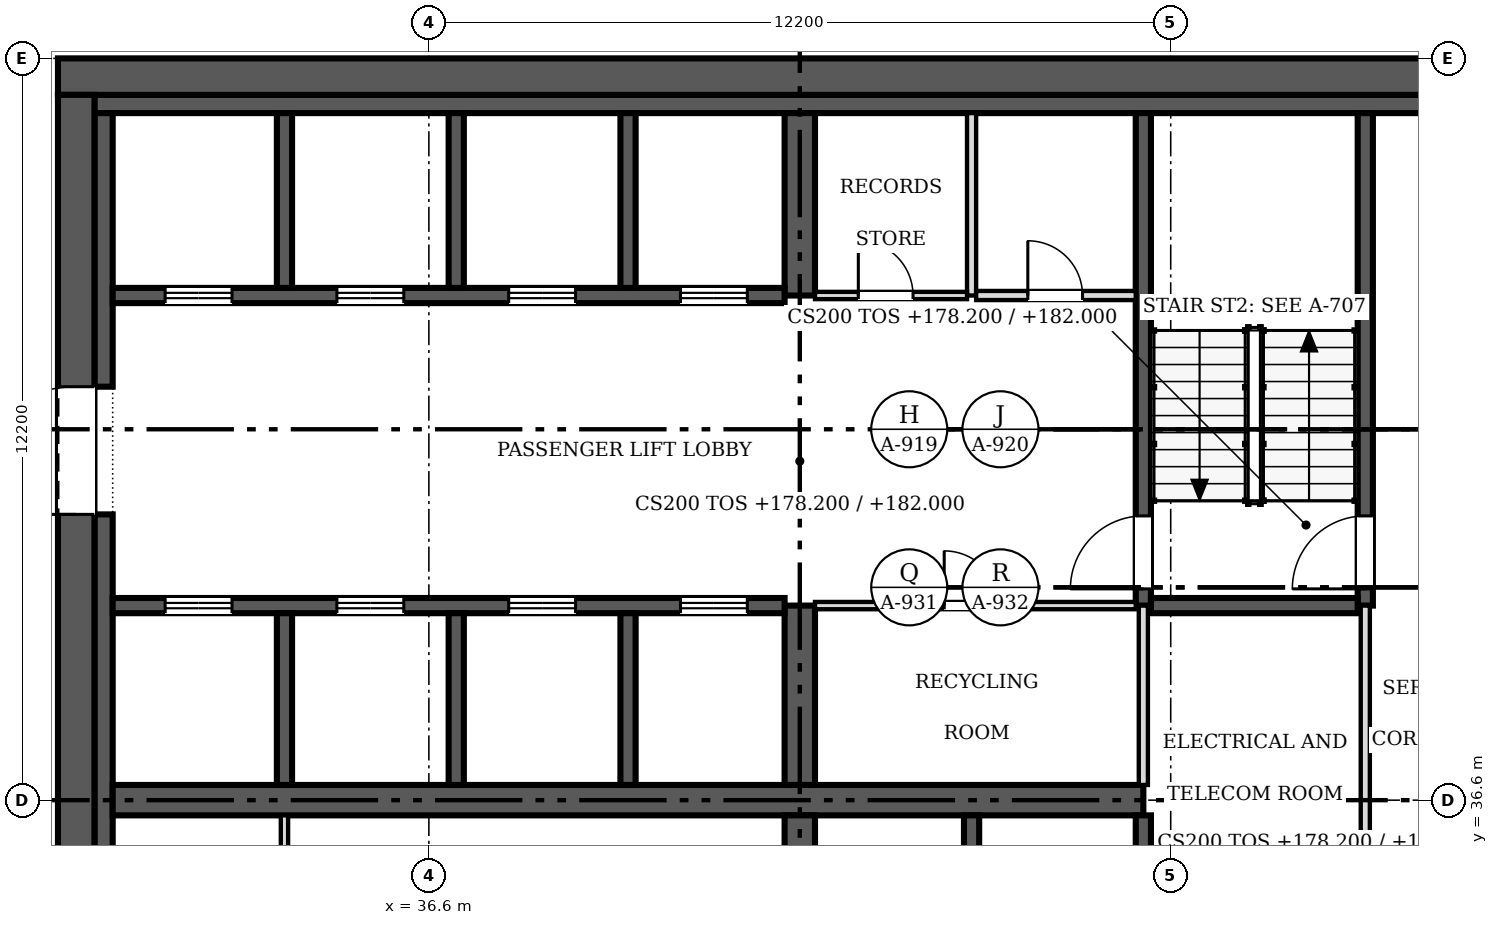
"""IFC4 building model, lengths in metres.
Left out: names, types, materials, properties, quantities, classifications, styles, units other than length and angle.
Written with IfcOpenShell. Run it as: python <this file> out.ifc"""

import sys

from ifc_helpers import new_model, si_unit, direction, frame, frame_2d, origin, place, context, subcontext, project, spatial, rectangle, extrude, source, transform, mapped, element, fill, save


model = new_model("IFC4")
c1 = context("Model", 3, precision=1e-05, world=origin(), true_north=direction((0.0, 1.0)))
c2 = subcontext(c1, "Body", "Model", "MODEL_VIEW")
j1 = project(units=[si_unit("LENGTHUNIT", "METRE"), si_unit("PLANEANGLEUNIT", "RADIAN")], contexts=[c1])
p1 = place(None, origin())
s1 = spatial("IfcSite", under=j1, at=p1, CompositionType="ELEMENT")
p2 = place(p1, origin())
s2 = spatial("IfcBuilding", under=s1, at=p2, CompositionType="ELEMENT")
p3 = place(p2, frame((0.0, 0.0, 178.2)))
s3 = spatial("IfcBuildingStorey", under=s2, at=p3, CompositionType="ELEMENT", Elevation=178.2)
p4 = place(p3, frame((30.8, 25.0, 0.0), z_axis=(0.0, 0.0, 1.0), x_axis=(0.0, 1.0, 0.0)))
e1 = element("IfcWall", 1, at=p4, inside=s3, PredefinedType="SHEAR", context=c2, shape_type="SweptSolid", body=[
    extrude(rectangle(XDim=23.2, YDim=0.6, at=frame_2d((11.6, 0.0))), origin(), (0.0, 0.0, 1.0), 3.8),
])
m1 = source(origin(), c2, "Body", "SweptSolid", [
    extrude(rectangle(XDim=2.1, YDim=2.4, at=frame_2d((1.05, 1.2))), frame((0.0, 0.31, 0.0), z_axis=(0.0, -1.0, 0.0), x_axis=(1.0, 0.0, 0.0)), (0.0, 0.0, 1.0), 0.62),
])
p5 = place(p4, frame((4.8, 0.0, 0.0)))
e2 = element("IfcOpeningElement", 2, at=p5, cuts=e1, PredefinedType="OPENING", context=c2, shape_type="MappedRepresentation", body=[
    mapped(m1, transform((0.0, 0.0, 0.0), scale=1.0)),
])
p6 = place(p4, frame((16.3, 0.0, 0.0)))
e3 = element("IfcOpeningElement", 3, at=p6, cuts=e1, PredefinedType="OPENING", context=c2, shape_type="MappedRepresentation", body=[
    mapped(m1, transform((0.0, 0.0, 0.0), scale=1.0)),
])
p7 = place(p3, frame((30.5, 48.5, 0.0), z_axis=(0.0, 0.0, 1.0), x_axis=(1.0, 0.0, 0.0)))
e4 = element("IfcWall", 4, at=p7, inside=s3, PredefinedType="SHEAR", context=c2, shape_type="SweptSolid", body=[
    extrude(rectangle(XDim=24.4, YDim=0.6, at=frame_2d((12.2, 0.0))), origin(), (0.0, 0.0, 1.0), 3.8),
])
p8 = place(p3, frame((31.1, 48.05, 0.0), z_axis=(0.0, 0.0, 1.0), x_axis=(1.0, 0.0, 0.0)))
e5 = element("IfcWall", 5, at=p8, inside=s3, PredefinedType="SOLIDWALL", context=c2, shape_type="SweptSolid", body=[
    extrude(rectangle(XDim=23.2, YDim=0.3, at=frame_2d((11.6, 0.0))), origin(), (0.0, 0.0, 1.0), 3.8),
])
p9 = place(p3, frame((31.25, 31.9, 0.0), z_axis=(0.0, 0.0, 1.0), x_axis=(0.0, 1.0, 0.0)))
e6 = element("IfcWall", 6, at=p9, inside=s3, PredefinedType="SOLIDWALL", context=c2, shape_type="SweptSolid", body=[
    extrude(rectangle(XDim=9.4, YDim=0.3, at=frame_2d((4.7, 0.0))), origin(), (0.0, 0.0, 1.0), 3.8),
])
p10 = place(p3, frame((31.25, 43.4, 0.0), z_axis=(0.0, 0.0, 1.0), x_axis=(0.0, 1.0, 0.0)))
e7 = element("IfcWall", 7, at=p10, inside=s3, PredefinedType="SOLIDWALL", context=c2, shape_type="SweptSolid", body=[
    extrude(rectangle(XDim=4.5, YDim=0.3, at=frame_2d((2.25, 0.0))), origin(), (0.0, 0.0, 1.0), 3.8),
])
p11 = place(p3, frame((31.4, 36.6, 0.0), z_axis=(0.0, 0.0, 1.0), x_axis=(1.0, 0.0, 0.0)))
e8 = element("IfcWall", 8, at=p11, inside=s3, PredefinedType="SHEAR", context=c2, shape_type="SweptSolid", body=[
    extrude(rectangle(XDim=16.95, YDim=0.5, at=frame_2d((8.475, 0.0))), origin(), (0.0, 0.0, 1.0), 3.8),
])
p12 = place(p3, frame((42.7, 36.35, 0.0), z_axis=(0.0, 0.0, 1.0), x_axis=(0.0, -1.0, 0.0)))
e9 = element("IfcWall", 9, at=p12, inside=s3, PredefinedType="SHEAR", context=c2, shape_type="SweptSolid", body=[
    extrude(rectangle(XDim=11.05, YDim=0.5, at=frame_2d((5.525, 0.0))), origin(), (0.0, 0.0, 1.0), 3.8),
])
m2 = source(origin(), c2, "Body", "SweptSolid", [
    extrude(rectangle(XDim=0.9, YDim=2.1, at=frame_2d((0.45, 1.05))), frame((0.0, 0.26, 0.0), z_axis=(0.0, -1.0, 0.0), x_axis=(1.0, 0.0, 0.0)), (0.0, 0.0, 1.0), 0.52),
])
p13 = place(p12, frame((6.5, 0.0, 0.0)))
e10 = element("IfcOpeningElement", 10, at=p13, cuts=e9, PredefinedType="OPENING", context=c2, shape_type="MappedRepresentation", body=[
    mapped(m2, transform((0.0, 0.0, 0.0), scale=1.0)),
])
m3 = source(origin(), c2, "Body", "SweptSolid", [
    extrude(rectangle(XDim=1.1, YDim=2.1, at=frame_2d((0.55, 1.05))), frame((0.0, 0.26, 0.0), z_axis=(0.0, -1.0, 0.0), x_axis=(1.0, 0.0, 0.0)), (0.0, 0.0, 1.0), 0.52),
])
p14 = place(p12, frame((3.8, 0.0, 0.0)))
e11 = element("IfcOpeningElement", 11, at=p14, cuts=e9, PredefinedType="OPENING", context=c2, shape_type="MappedRepresentation", body=[
    mapped(m3, transform((0.0, 0.0, 0.0), scale=1.0)),
])
p15 = place(p3, frame((42.7, 36.85, 0.0), z_axis=(0.0, 0.0, 1.0), x_axis=(0.0, 1.0, 0.0)))
e12 = element("IfcWall", 12, at=p15, inside=s3, PredefinedType="SHEAR", context=c2, shape_type="SweptSolid", body=[
    extrude(rectangle(XDim=2.95, YDim=0.5, at=frame_2d((1.475, 0.0))), origin(), (0.0, 0.0, 1.0), 3.8),
])
p16 = place(p3, frame((42.7, 44.9, 0.0), z_axis=(0.0, 0.0, 1.0), x_axis=(0.0, 1.0, 0.0)))
e13 = element("IfcWall", 13, at=p16, inside=s3, PredefinedType="SHEAR", context=c2, shape_type="SweptSolid", body=[
    extrude(rectangle(XDim=3.0, YDim=0.5, at=frame_2d((1.5, 0.0))), origin(), (0.0, 0.0, 1.0), 3.8),
])
p17 = place(p3, frame((31.4, 39.8, 0.0), z_axis=(0.0, 0.0, 1.0), x_axis=(1.0, 0.0, 0.0)))
e14 = element("IfcWall", 14, at=p17, inside=s3, PredefinedType="SOLIDWALL", context=c2, shape_type="SweptSolid", body=[
    extrude(rectangle(XDim=11.05, YDim=0.25, at=frame_2d((5.525, 0.0))), origin(), (0.0, 0.0, 1.0), 3.8),
])
m4 = source(origin(), c2, "Body", "SweptSolid", [
    extrude(rectangle(XDim=1.1, YDim=2.1, at=frame_2d((0.55, 1.05))), frame((0.0, 0.135, 0.0), z_axis=(0.0, -1.0, 0.0), x_axis=(1.0, 0.0, 0.0)), (0.0, 0.0, 1.0), 0.27),
])
p18 = place(p17, frame((0.863, 0.0, 0.0)))
e15 = element("IfcOpeningElement", 15, at=p18, cuts=e14, PredefinedType="OPENING", context=c2, shape_type="MappedRepresentation", body=[
    mapped(m4, transform((0.0, 0.0, 0.0), scale=1.0)),
])
p19 = place(p17, frame((3.688, 0.0, 0.0)))
e16 = element("IfcOpeningElement", 16, at=p19, cuts=e14, PredefinedType="OPENING", context=c2, shape_type="MappedRepresentation", body=[
    mapped(m4, transform((0.0, 0.0, 0.0), scale=1.0)),
])
p20 = place(p17, frame((6.512, 0.0, 0.0)))
e17 = element("IfcOpeningElement", 17, at=p20, cuts=e14, PredefinedType="OPENING", context=c2, shape_type="MappedRepresentation", body=[
    mapped(m4, transform((0.0, 0.0, 0.0), scale=1.0)),
])
p21 = place(p17, frame((9.337, 0.0, 0.0)))
e18 = element("IfcOpeningElement", 18, at=p21, cuts=e14, PredefinedType="OPENING", context=c2, shape_type="MappedRepresentation", body=[
    mapped(m4, transform((0.0, 0.0, 0.0), scale=1.0)),
])
p22 = place(p3, frame((42.45, 44.9, 0.0), z_axis=(0.0, 0.0, 1.0), x_axis=(-1.0, 0.0, 0.0)))
e19 = element("IfcWall", 19, at=p22, inside=s3, PredefinedType="SOLIDWALL", context=c2, shape_type="SweptSolid", body=[
    extrude(rectangle(XDim=11.05, YDim=0.25, at=frame_2d((5.525, 0.0))), origin(), (0.0, 0.0, 1.0), 3.8),
])
p23 = place(p22, frame((9.087, 0.0, 0.0)))
e20 = element("IfcOpeningElement", 20, at=p23, cuts=e19, PredefinedType="OPENING", context=c2, shape_type="MappedRepresentation", body=[
    mapped(m4, transform((0.0, 0.0, 0.0), scale=1.0)),
])
p24 = place(p22, frame((6.262, 0.0, 0.0)))
e21 = element("IfcOpeningElement", 21, at=p24, cuts=e19, PredefinedType="OPENING", context=c2, shape_type="MappedRepresentation", body=[
    mapped(m4, transform((0.0, 0.0, 0.0), scale=1.0)),
])
p25 = place(p22, frame((3.438, 0.0, 0.0)))
e22 = element("IfcOpeningElement", 22, at=p25, cuts=e19, PredefinedType="OPENING", context=c2, shape_type="MappedRepresentation", body=[
    mapped(m4, transform((0.0, 0.0, 0.0), scale=1.0)),
])
p26 = place(p22, frame((0.613, 0.0, 0.0)))
e23 = element("IfcOpeningElement", 23, at=p26, cuts=e19, PredefinedType="OPENING", context=c2, shape_type="MappedRepresentation", body=[
    mapped(m4, transform((0.0, 0.0, 0.0), scale=1.0)),
])
p27 = place(p3, frame((48.35, 36.35, 0.0), z_axis=(0.0, 0.0, 1.0), x_axis=(0.0, -1.0, 0.0)))
e24 = element("IfcWall", 24, at=p27, inside=s3, PredefinedType="SOLIDWALL", context=c2, shape_type="SweptSolid", body=[
    extrude(rectangle(XDim=11.05, YDim=0.25, at=frame_2d((5.525, 0.0))), origin(), (0.0, 0.0, 1.0), 3.8),
])
m5 = source(origin(), c2, "Body", "SweptSolid", [
    extrude(rectangle(XDim=1.2, YDim=2.1, at=frame_2d((0.6, 1.05))), frame((0.0, 0.135, 0.0), z_axis=(0.0, -1.0, 0.0), x_axis=(1.0, 0.0, 0.0)), (0.0, 0.0, 1.0), 0.27),
])
p28 = place(p27, frame((3.225, 0.0, 0.0)))
e25 = element("IfcOpeningElement", 25, at=p28, cuts=e24, PredefinedType="OPENING", context=c2, shape_type="MappedRepresentation", body=[
    mapped(m5, transform((0.0, 0.0, 0.0), scale=1.0)),
])
p29 = place(p3, frame((48.35, 47.9, 0.0), z_axis=(0.0, 0.0, 1.0), x_axis=(0.0, -1.0, 0.0)))
e26 = element("IfcWall", 26, at=p29, inside=s3, PredefinedType="SOLIDWALL", context=c2, shape_type="SweptSolid", body=[
    extrude(rectangle(XDim=8.1, YDim=0.25, at=frame_2d((4.05, 0.0))), origin(), (0.0, 0.0, 1.0), 3.8),
])
p30 = place(p29, frame((6.625, 0.0, 0.0)))
e27 = element("IfcOpeningElement", 27, at=p30, cuts=e26, PredefinedType="OPENING", context=c2, shape_type="MappedRepresentation", body=[
    mapped(m5, transform((0.0, 0.0, 0.0), scale=1.0)),
])
p31 = place(p3, frame((52.0, 39.8, 0.0), z_axis=(0.0, 0.0, 1.0), x_axis=(0.0, 1.0, 0.0)))
e28 = element("IfcWall", 28, at=p31, inside=s3, PredefinedType="SOLIDWALL", context=c2, shape_type="SweptSolid", body=[
    extrude(rectangle(XDim=8.1, YDim=0.25, at=frame_2d((4.05, 0.0))), origin(), (0.0, 0.0, 1.0), 3.8),
])
p32 = place(p31, frame((0.275, 0.0, 0.0)))
e29 = element("IfcOpeningElement", 29, at=p32, cuts=e28, PredefinedType="OPENING", context=c2, shape_type="MappedRepresentation", body=[
    mapped(m5, transform((0.0, 0.0, 0.0), scale=1.0)),
])
p33 = place(p3, frame((48.475, 39.8, 0.0), z_axis=(0.0, 0.0, 1.0), x_axis=(1.0, 0.0, 0.0)))
e30 = element("IfcWall", 30, at=p33, inside=s3, PredefinedType="SOLIDWALL", context=c2, shape_type="SweptSolid", body=[
    extrude(rectangle(XDim=3.4, YDim=0.25, at=frame_2d((1.7, 0.0))), origin(), (0.0, 0.0, 1.0), 3.8),
])
for number, where, z_axis, x_axis in (
    (31, (34.225, 36.85, 0.0), (0.0, 0.0, 1.0), (0.0, 1.0, 0.0)),
    (32, (37.05, 36.85, 0.0), (0.0, 0.0, 1.0), (0.0, 1.0, 0.0)),
    (33, (39.875, 36.85, 0.0), (0.0, 0.0, 1.0), (0.0, 1.0, 0.0)),
):
    element("IfcWall", number, at=place(p3, frame(where, z_axis=z_axis, x_axis=x_axis)), inside=s3, PredefinedType="SOLIDWALL", context=c2, shape_type="SweptSolid", body=[
        extrude(rectangle(XDim=2.825, YDim=0.25, at=frame_2d((1.413, 0.0))), origin(), (0.0, 0.0, 1.0), 3.8),
    ])
p34 = place(p3, frame((45.525, 33.525, 0.0), z_axis=(0.0, 0.0, 1.0), x_axis=(0.0, 1.0, 0.0)))
e34 = element("IfcWall", 34, at=p34, inside=s3, PredefinedType="SOLIDWALL", context=c2, shape_type="SweptSolid", body=[
    extrude(rectangle(XDim=2.825, YDim=0.25, at=frame_2d((1.413, 0.0))), origin(), (0.0, 0.0, 1.0), 3.8),
])
for number, where, z_axis, x_axis in (
    (35, (34.225, 45.025, 0.0), (0.0, 0.0, 1.0), (0.0, 1.0, 0.0)),
    (36, (37.05, 45.025, 0.0), (0.0, 0.0, 1.0), (0.0, 1.0, 0.0)),
    (37, (39.875, 45.025, 0.0), (0.0, 0.0, 1.0), (0.0, 1.0, 0.0)),
):
    element("IfcWall", number, at=place(p3, frame(where, z_axis=z_axis, x_axis=x_axis)), inside=s3, PredefinedType="SOLIDWALL", context=c2, shape_type="SweptSolid", body=[
        extrude(rectangle(XDim=2.875, YDim=0.25, at=frame_2d((1.438, 0.0))), origin(), (0.0, 0.0, 1.0), 3.8),
    ])
p35 = place(p3, frame((52.0, 33.525, 0.0), z_axis=(0.0, 0.0, 1.0), x_axis=(0.0, 1.0, 0.0)))
e38 = element("IfcWall", 38, at=p35, inside=s3, PredefinedType="PARTITIONING", context=c2, shape_type="SweptSolid", body=[
    extrude(rectangle(XDim=6.275, YDim=0.15, at=frame_2d((3.138, 0.0))), origin(), (0.0, 0.0, 1.0), 3.6),
])
m6 = source(origin(), c2, "Body", "SweptSolid", [
    extrude(rectangle(XDim=0.9, YDim=2.1, at=frame_2d((0.45, 1.05))), frame((0.0, 0.085, 0.0), z_axis=(0.0, -1.0, 0.0), x_axis=(1.0, 0.0, 0.0)), (0.0, 0.0, 1.0), 0.17),
])
p36 = place(p35, frame((1.025, 0.0, 0.0)))
e39 = element("IfcOpeningElement", 39, at=p36, cuts=e38, PredefinedType="OPENING", context=c2, shape_type="MappedRepresentation", body=[
    mapped(m6, transform((0.0, 0.0, 0.0), scale=1.0)),
])
p37 = place(p3, frame((48.225, 39.8, 0.0), z_axis=(0.0, 0.0, 1.0), x_axis=(-1.0, 0.0, 0.0)))
e40 = element("IfcWall", 40, at=p37, inside=s3, PredefinedType="PARTITIONING", context=c2, shape_type="SweptSolid", body=[
    extrude(rectangle(XDim=5.275, YDim=0.12, at=frame_2d((2.638, 0.0))), origin(), (0.0, 0.0, 1.0), 3.6),
])
m7 = source(origin(), c2, "Body", "SweptSolid", [
    extrude(rectangle(XDim=0.9, YDim=2.1, at=frame_2d((0.45, 1.05))), frame((0.0, 0.07, 0.0), z_axis=(0.0, -1.0, 0.0), x_axis=(1.0, 0.0, 0.0)), (0.0, 0.0, 1.0), 0.14),
])
p38 = place(p37, frame((2.25, 0.0, 0.0)))
e41 = element("IfcOpeningElement", 41, at=p38, cuts=e40, PredefinedType="OPENING", context=c2, shape_type="MappedRepresentation", body=[
    mapped(m7, transform((0.0, 0.0, 0.0), scale=1.0)),
])
p39 = place(p3, frame((48.35, 36.85, 0.0), z_axis=(0.0, 0.0, 1.0), x_axis=(0.0, 1.0, 0.0)))
e42 = element("IfcWall", 42, at=p39, inside=s3, PredefinedType="PARTITIONING", context=c2, shape_type="SweptSolid", body=[
    extrude(rectangle(XDim=2.95, YDim=0.15, at=frame_2d((1.475, 0.0))), origin(), (0.0, 0.0, 1.0), 3.6),
])
p40 = place(p3, frame((34.225, 33.46, 0.0), z_axis=(0.0, 0.0, 1.0), x_axis=(0.0, 1.0, 0.0)))
e43 = element("IfcWall", 43, at=p40, inside=s3, PredefinedType="PARTITIONING", context=c2, shape_type="SweptSolid", body=[
    extrude(rectangle(XDim=2.89, YDim=0.12, at=frame_2d((1.445, 0.0))), origin(), (0.0, 0.0, 1.0), 3.6),
])
p41 = place(p3, frame((45.525, 44.9, 0.0), z_axis=(0.0, 0.0, 1.0), x_axis=(0.0, 1.0, 0.0)))
e44 = element("IfcWall", 44, at=p41, inside=s3, PredefinedType="PARTITIONING", context=c2, shape_type="SweptSolid", body=[
    extrude(rectangle(XDim=3.0, YDim=0.15, at=frame_2d((1.5, 0.0))), origin(), (0.0, 0.0, 1.0), 3.6),
])
p42 = place(p3, frame((42.95, 44.9, 0.0), z_axis=(0.0, 0.0, 1.0), x_axis=(1.0, 0.0, 0.0)))
e45 = element("IfcWall", 45, at=p42, inside=s3, PredefinedType="PARTITIONING", context=c2, shape_type="SweptSolid", body=[
    extrude(rectangle(XDim=2.5, YDim=0.12, at=frame_2d((1.25, 0.0))), origin(), (0.0, 0.0, 1.0), 3.6),
])
p43 = place(p42, frame((0.712, 0.0, 0.0)))
e46 = element("IfcOpeningElement", 46, at=p43, cuts=e45, PredefinedType="OPENING", context=c2, shape_type="MappedRepresentation", body=[
    mapped(m7, transform((0.0, 0.0, 0.0), scale=1.0)),
])
p44 = place(p3, frame((45.6, 44.9, 0.0), z_axis=(0.0, 0.0, 1.0), x_axis=(1.0, 0.0, 0.0)))
e47 = element("IfcWall", 47, at=p44, inside=s3, PredefinedType="PARTITIONING", context=c2, shape_type="SweptSolid", body=[
    extrude(rectangle(XDim=2.625, YDim=0.15, at=frame_2d((1.312, 0.0))), origin(), (0.0, 0.0, 1.0), 3.6),
])
p45 = place(p44, frame((0.85, 0.0, 0.0)))
e48 = element("IfcOpeningElement", 48, at=p45, cuts=e47, PredefinedType="OPENING", context=c2, shape_type="MappedRepresentation", body=[
    mapped(m6, transform((0.0, 0.0, 0.0), scale=1.0)),
])
m8 = source(origin(), c2, "Body", "SweptSolid", [
    extrude(rectangle(XDim=2.1, YDim=2.4, at=frame_2d((1.05, 1.2))), frame((0.0, 0.025, 0.0), z_axis=(0.0, -1.0, 0.0), x_axis=(1.0, 0.0, 0.0)), (0.0, 0.0, 1.0), 0.05),
])
p46 = place(p6, origin())
e49 = element("IfcDoor", 49, at=p46, inside=s3, OperationType="DOUBLE_DOOR_SINGLE_SWING", PredefinedType="DOOR", context=c2, shape_type="MappedRepresentation", body=[
    mapped(m8, transform((0.0, 0.0, 0.0), scale=1.0)),
])
fill(e3, e49)
m9 = source(origin(), c2, "Body", "SweptSolid", [
    extrude(rectangle(XDim=1.1, YDim=2.1, at=frame_2d((0.55, 1.05))), frame((0.0, 0.025, 0.0), z_axis=(0.0, -1.0, 0.0), x_axis=(1.0, 0.0, 0.0)), (0.0, 0.0, 1.0), 0.05),
])
p47 = place(p18, origin())
e50 = element("IfcDoor", 50, at=p47, inside=s3, OperationType="DOUBLE_DOOR_SLIDING", PredefinedType="DOOR", context=c2, shape_type="MappedRepresentation", body=[
    mapped(m9, transform((0.0, 0.0, 0.0), scale=1.0)),
])
fill(e15, e50)
p48 = place(p19, origin())
e51 = element("IfcDoor", 51, at=p48, inside=s3, OperationType="DOUBLE_DOOR_SLIDING", PredefinedType="DOOR", context=c2, shape_type="MappedRepresentation", body=[
    mapped(m9, transform((0.0, 0.0, 0.0), scale=1.0)),
])
fill(e16, e51)
p49 = place(p20, origin())
e52 = element("IfcDoor", 52, at=p49, inside=s3, OperationType="DOUBLE_DOOR_SLIDING", PredefinedType="DOOR", context=c2, shape_type="MappedRepresentation", body=[
    mapped(m9, transform((0.0, 0.0, 0.0), scale=1.0)),
])
fill(e17, e52)
p50 = place(p21, origin())
e53 = element("IfcDoor", 53, at=p50, inside=s3, OperationType="DOUBLE_DOOR_SLIDING", PredefinedType="DOOR", context=c2, shape_type="MappedRepresentation", body=[
    mapped(m9, transform((0.0, 0.0, 0.0), scale=1.0)),
])
fill(e18, e53)
p51 = place(p23, origin())
e54 = element("IfcDoor", 54, at=p51, inside=s3, OperationType="DOUBLE_DOOR_SLIDING", PredefinedType="DOOR", context=c2, shape_type="MappedRepresentation", body=[
    mapped(m9, transform((0.0, 0.0, 0.0), scale=1.0)),
])
fill(e20, e54)
p52 = place(p24, origin())
e55 = element("IfcDoor", 55, at=p52, inside=s3, OperationType="DOUBLE_DOOR_SLIDING", PredefinedType="DOOR", context=c2, shape_type="MappedRepresentation", body=[
    mapped(m9, transform((0.0, 0.0, 0.0), scale=1.0)),
])
fill(e21, e55)
p53 = place(p25, origin())
e56 = element("IfcDoor", 56, at=p53, inside=s3, OperationType="DOUBLE_DOOR_SLIDING", PredefinedType="DOOR", context=c2, shape_type="MappedRepresentation", body=[
    mapped(m9, transform((0.0, 0.0, 0.0), scale=1.0)),
])
fill(e22, e56)
p54 = place(p26, origin())
e57 = element("IfcDoor", 57, at=p54, inside=s3, OperationType="DOUBLE_DOOR_SLIDING", PredefinedType="DOOR", context=c2, shape_type="MappedRepresentation", body=[
    mapped(m9, transform((0.0, 0.0, 0.0), scale=1.0)),
])
fill(e23, e57)
m10 = source(origin(), c2, "Body", "SweptSolid", [
    extrude(rectangle(XDim=1.2, YDim=2.1, at=frame_2d((0.6, 1.05))), frame((0.0, 0.025, 0.0), z_axis=(0.0, -1.0, 0.0), x_axis=(1.0, 0.0, 0.0)), (0.0, 0.0, 1.0), 0.05),
])
p55 = place(p30, origin())
e58 = element("IfcDoor", 58, at=p55, inside=s3, OperationType="SINGLE_SWING_RIGHT", PredefinedType="DOOR", context=c2, shape_type="MappedRepresentation", body=[
    mapped(m10, transform((0.0, 0.0, 0.0), scale=1.0)),
])
fill(e27, e58)
p56 = place(p32, origin())
e59 = element("IfcDoor", 59, at=p56, inside=s3, OperationType="SINGLE_SWING_LEFT", PredefinedType="DOOR", context=c2, shape_type="MappedRepresentation", body=[
    mapped(m10, transform((0.0, 0.0, 0.0), scale=1.0)),
])
fill(e29, e59)
m11 = source(origin(), c2, "Body", "SweptSolid", [
    extrude(rectangle(XDim=0.9, YDim=2.1, at=frame_2d((0.45, 1.05))), frame((0.0, 0.025, 0.0), z_axis=(0.0, -1.0, 0.0), x_axis=(1.0, 0.0, 0.0)), (0.0, 0.0, 1.0), 0.05),
])
p57 = place(p38, origin())
e60 = element("IfcDoor", 60, at=p57, inside=s3, OperationType="SINGLE_SWING_RIGHT", PredefinedType="DOOR", context=c2, shape_type="MappedRepresentation", body=[
    mapped(m11, transform((0.0, 0.0, 0.0), scale=1.0)),
])
fill(e41, e60)
p58 = place(p43, origin())
e61 = element("IfcDoor", 61, at=p58, inside=s3, OperationType="SINGLE_SWING_LEFT", PredefinedType="DOOR", context=c2, shape_type="MappedRepresentation", body=[
    mapped(m11, transform((0.0, 0.0, 0.0), scale=1.0)),
])
fill(e46, e61)
p59 = place(p45, origin())
e62 = element("IfcDoor", 62, at=p59, inside=s3, OperationType="SINGLE_SWING_LEFT", PredefinedType="DOOR", context=c2, shape_type="MappedRepresentation", body=[
    mapped(m11, transform((0.0, 0.0, 0.0), scale=1.0)),
])
fill(e48, e62)
save(model, sys.argv[1])
